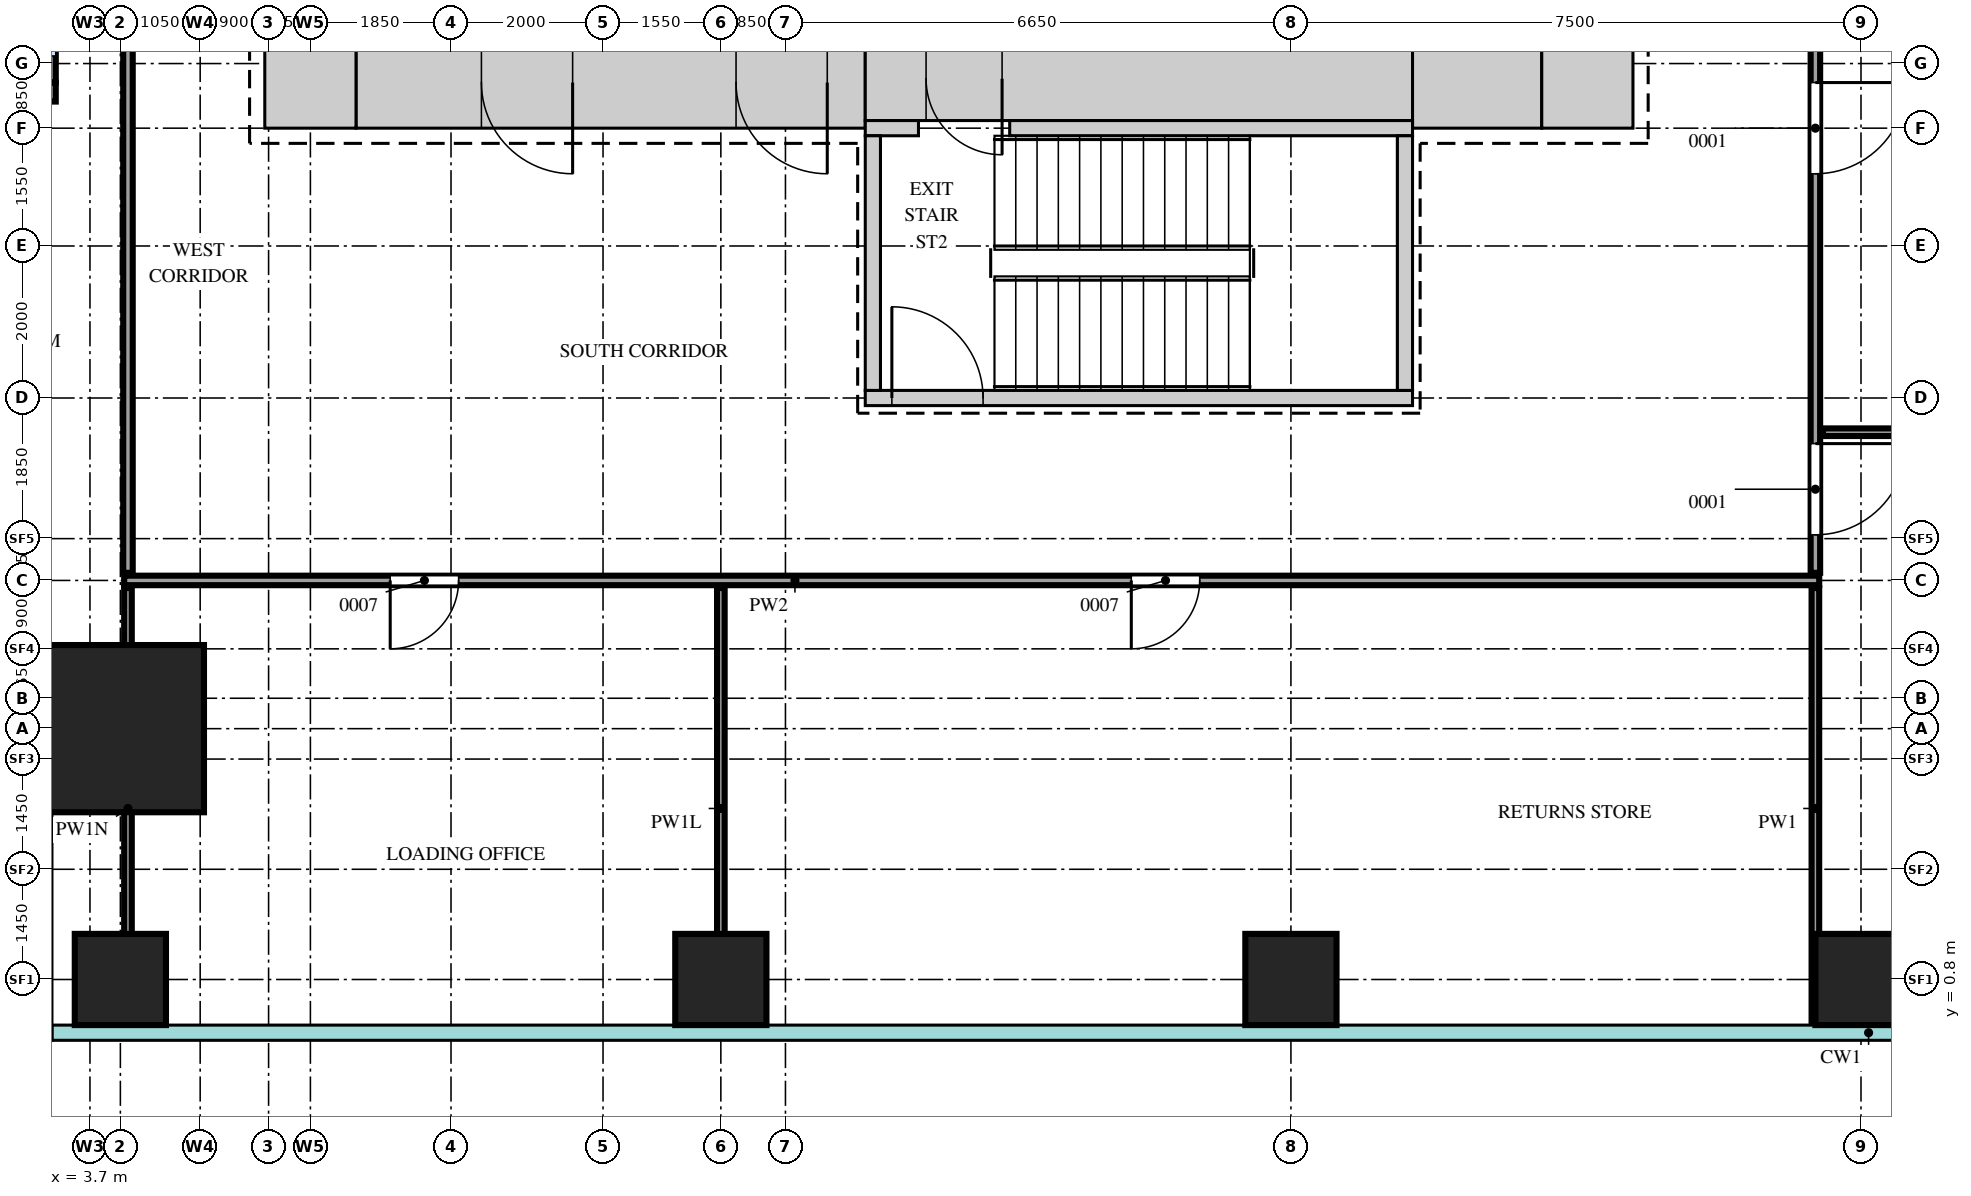
"""IFC4 building model, lengths in metres.
Left out: names, types, materials, properties, quantities, classifications, styles, units other than length and angle.
Written with IfcOpenShell. Run it as: python <this file> out.ifc"""

import sys

from ifc_helpers import new_model, si_unit, direction, frame, frame_2d, origin, origin_2d, place, context, subcontext, project, spatial, rectangle, extrude, source, transform, mapped, element, fill, save


model = new_model("IFC4")
c1 = context("Model", 3, precision=1e-05, world=origin(), true_north=direction((0.0, 1.0)))
c2 = subcontext(c1, "Body", "Model", "MODEL_VIEW")
j1 = project(units=[si_unit("LENGTHUNIT", "METRE"), si_unit("PLANEANGLEUNIT", "RADIAN")], contexts=[c1])
p1 = place(None, origin())
s1 = spatial("IfcSite", under=j1, at=p1, CompositionType="ELEMENT")
p2 = place(p1, origin())
s2 = spatial("IfcBuilding", under=s1, at=p2, CompositionType="ELEMENT")
p3 = place(p2, frame((0.0, 0.0, 91.5)))
s3 = spatial("IfcBuildingStorey", under=s2, at=p3, CompositionType="ELEMENT", Elevation=91.5)
m1 = source(origin(), c2, "Body", "SweptSolid", [
    extrude(rectangle(XDim=6.7, YDim=1.2, at=frame_2d((3.35, 0.0))), origin(), (0.0, 0.0, 1.0), 4.2),
])
p4 = place(p3, frame((7.2, 12.6, 0.0), z_axis=(0.0, 0.0, 1.0), x_axis=(1.0, 0.0, 0.0)))
e1 = element("IfcWall", 1, at=p4, inside=s3, PredefinedType="SHEAR", context=c2, shape_type="MappedRepresentation", body=[
    mapped(m1, transform((0.0, 0.0, 0.0))),
])
m2 = source(origin(), c2, "Body", "SweptSolid", [
    extrude(rectangle(XDim=1.2, YDim=2.1, at=frame_2d((0.6, 1.05))), frame((0.0, 0.61, 0.0), z_axis=(0.0, -1.0, 0.0), x_axis=(1.0, 0.0, 0.0)), (0.0, 0.0, 1.0), 1.22),
])
p5 = place(p4, frame((5.0, 0.0, 0.0)))
e2 = element("IfcOpeningElement", 2, at=p5, cuts=e1, PredefinedType="OPENING", context=c2, shape_type="MappedRepresentation", body=[
    mapped(m2, transform((0.0, 0.0, 0.0))),
])
p6 = place(p4, frame((1.65, 0.0, 0.0)))
e3 = element("IfcOpeningElement", 3, at=p6, cuts=e1, PredefinedType="OPENING", context=c2, shape_type="MappedRepresentation", body=[
    mapped(m2, transform((0.0, 0.0, 0.0))),
])
m3 = source(origin(), c2, "Body", "SweptSolid", [
    extrude(rectangle(XDim=7.2, YDim=1.1, at=frame_2d((3.6, 0.0))), origin(), (0.0, 0.0, 1.0), 4.2),
])
p7 = place(p3, frame((13.9, 12.65, 0.0), z_axis=(0.0, 0.0, 1.0), x_axis=(1.0, 0.0, 0.0)))
e4 = element("IfcWall", 4, at=p7, inside=s3, PredefinedType="SHEAR", context=c2, shape_type="MappedRepresentation", body=[
    mapped(m3, transform((0.0, 0.0, 0.0))),
])
m4 = source(origin(), c2, "Body", "SweptSolid", [
    extrude(rectangle(XDim=1.0, YDim=2.1, at=frame_2d((0.5, 1.05))), frame((0.0, 0.56, 0.0), z_axis=(0.0, -1.0, 0.0), x_axis=(1.0, 0.0, 0.0)), (0.0, 0.0, 1.0), 1.12),
])
p8 = place(p7, frame((0.8, 0.0, 0.0)))
e5 = element("IfcOpeningElement", 5, at=p8, cuts=e4, PredefinedType="OPENING", context=c2, shape_type="MappedRepresentation", body=[
    mapped(m4, transform((0.0, 0.0, 0.0))),
])
m5 = source(origin(), c2, "Body", "SweptSolid", [
    extrude(rectangle(XDim=1.7, YDim=1.2, at=frame_2d((0.85, 0.0))), origin(), (0.0, 0.0, 1.0), 4.2),
])
p9 = place(p3, frame((21.1, 12.6, 0.0), z_axis=(0.0, 0.0, 1.0), x_axis=(1.0, 0.0, 0.0)))
e6 = element("IfcWall", 6, at=p9, inside=s3, PredefinedType="SHEAR", context=c2, shape_type="MappedRepresentation", body=[
    mapped(m5, transform((0.0, 0.0, 0.0))),
])
m6 = source(origin(), c2, "Body", "SweptSolid", [
    extrude(rectangle(XDim=1.2, YDim=1.2, at=frame_2d((0.6, 0.0))), origin(), (0.0, 0.0, 1.0), 4.2),
])
for number, where, z_axis, x_axis in (
    (7, (22.8, 12.6, 0.0), (0.0, 0.0, 1.0), (1.0, 0.0, 0.0)),
    (8, (6.0, 12.6, 0.0), (0.0, 0.0, 1.0), (1.0, 0.0, 0.0)),
):
    element("IfcWall", number, at=place(p3, frame(where, z_axis=z_axis, x_axis=x_axis)), inside=s3, PredefinedType="SHEAR", context=c2, shape_type="MappedRepresentation", body=[
        mapped(m6, transform((0.0, 0.0, 0.0))),
    ])
m7 = source(origin(), c2, "Body", "SweptSolid", [
    extrude(rectangle(XDim=0.7, YDim=0.2, at=frame_2d((0.35, 0.0))), origin(), (0.0, 0.0, 1.0), 4.2),
])
p10 = place(p3, frame((13.9, 12.0, 0.0), z_axis=(0.0, 0.0, 1.0), x_axis=(1.0, 0.0, 0.0)))
e9 = element("IfcWall", 9, at=p10, inside=s3, PredefinedType="SHEAR", context=c2, shape_type="MappedRepresentation", body=[
    mapped(m7, transform((0.0, 0.0, 0.0))),
])
m8 = source(origin(), c2, "Body", "SweptSolid", [
    extrude(rectangle(XDim=5.3, YDim=0.2, at=frame_2d((2.65, 0.0))), origin(), (0.0, 0.0, 1.0), 4.2),
])
p11 = place(p3, frame((15.8, 12.0, 0.0), z_axis=(0.0, 0.0, 1.0), x_axis=(1.0, 0.0, 0.0)))
e10 = element("IfcWall", 10, at=p11, inside=s3, PredefinedType="SHEAR", context=c2, shape_type="MappedRepresentation", body=[
    mapped(m8, transform((0.0, 0.0, 0.0))),
])
m9 = source(origin(), c2, "Body", "SweptSolid", [
    extrude(rectangle(XDim=7.2, YDim=0.2, at=frame_2d((3.6, 0.0))), origin(), (0.0, 0.0, 1.0), 4.2),
])
p12 = place(p3, frame((13.9, 8.45, 0.0), z_axis=(0.0, 0.0, 1.0), x_axis=(1.0, 0.0, 0.0)))
e11 = element("IfcWall", 11, at=p12, inside=s3, PredefinedType="SHEAR", context=c2, shape_type="MappedRepresentation", body=[
    mapped(m9, transform((0.0, 0.0, 0.0))),
])
m10 = source(origin(), c2, "Body", "SweptSolid", [
    extrude(rectangle(XDim=1.2, YDim=2.1, at=frame_2d((0.6, 1.05))), frame((0.0, 0.11, 0.0), z_axis=(0.0, -1.0, 0.0), x_axis=(1.0, 0.0, 0.0)), (0.0, 0.0, 1.0), 0.22),
])
p13 = place(p12, frame((0.35, 0.0, 0.0)))
e12 = element("IfcOpeningElement", 12, at=p13, cuts=e11, PredefinedType="OPENING", context=c2, shape_type="MappedRepresentation", body=[
    mapped(m10, transform((0.0, 0.0, 0.0))),
])
m11 = source(origin(), c2, "Body", "SweptSolid", [
    extrude(rectangle(XDim=3.35, YDim=0.2, at=frame_2d((1.675, 0.0))), origin(), (0.0, 0.0, 1.0), 4.2),
])
for number, where, z_axis, x_axis in (
    (13, (21.0, 8.55, 0.0), (0.0, 0.0, 1.0), (0.0, 1.0, 0.0)),
    (14, (14.0, 8.55, 0.0), (0.0, 0.0, 1.0), (0.0, 1.0, 0.0)),
):
    element("IfcWall", number, at=place(p3, frame(where, z_axis=z_axis, x_axis=x_axis)), inside=s3, PredefinedType="SHEAR", context=c2, shape_type="MappedRepresentation", body=[
        mapped(m11, transform((0.0, 0.0, 0.0))),
    ])
m12 = source(origin(), c2, "Body", "SweptSolid", [
    extrude(rectangle(XDim=2.2, YDim=2.2, at=origin_2d()), origin(), (0.0, 0.0, 1.0), 4.5),
])
p14 = place(p3, frame((4.1, 4.1, 0.0), z_axis=(0.0, 0.0, 1.0), x_axis=(1.0, 0.0, 0.0)))
e15 = element("IfcColumn", 15, at=p14, inside=s3, PredefinedType="COLUMN", context=c2, shape_type="MappedRepresentation", body=[
    mapped(m12, transform((0.0, 0.0, 0.0))),
])
m13 = source(origin(), c2, "Body", "SweptSolid", [
    extrude(rectangle(XDim=1.2, YDim=1.2, at=origin_2d()), origin(), (0.0, 0.0, 1.0), 4.5),
])
for number, where, z_axis, x_axis in (
    (16, (4.1, 0.8, 0.0), (0.0, 0.0, 1.0), (1.0, 0.0, 0.0)),
    (17, (12.0, 0.8, 0.0), (0.0, 0.0, 1.0), (1.0, 0.0, 0.0)),
    (18, (19.5, 0.8, 0.0), (0.0, 0.0, 1.0), (1.0, 0.0, 0.0)),
    (19, (27.0, 0.8, 0.0), (0.0, 0.0, 1.0), (1.0, 0.0, 0.0)),
):
    element("IfcColumn", number, at=place(p3, frame(where, z_axis=z_axis, x_axis=x_axis)), inside=s3, PredefinedType="COLUMN", context=c2, shape_type="MappedRepresentation", body=[
        mapped(m13, transform((0.0, 0.0, 0.0))),
    ])
m14 = source(origin(), c2, "Body", "SweptSolid", [
    extrude(rectangle(XDim=6.3, YDim=0.25, at=frame_2d((3.15, 0.0))), origin(), (0.0, 0.0, 1.0), 4.2),
])
p15 = place(p3, frame((3.125, 12.6, 0.0), z_axis=(0.0, 0.0, 1.0), x_axis=(0.0, 1.0, 0.0)))
e20 = element("IfcWall", 20, at=p15, inside=s3, PredefinedType="SOLIDWALL", context=c2, shape_type="MappedRepresentation", body=[
    mapped(m14, transform((0.0, 0.0, 0.0))),
])
m15 = source(origin(), c2, "Body", "SweptSolid", [
    extrude(rectangle(XDim=1.6, YDim=2.4, at=frame_2d((0.8, 1.2))), frame((0.0, 0.135, 0.0), z_axis=(0.0, -1.0, 0.0), x_axis=(1.0, 0.0, 0.0)), (0.0, 0.0, 1.0), 0.27),
])
p16 = place(p15, frame((0.35, 0.0, 0.0)))
e21 = element("IfcOpeningElement", 21, at=p16, cuts=e20, PredefinedType="OPENING", context=c2, shape_type="MappedRepresentation", body=[
    mapped(m15, transform((0.0, 0.0, 0.0))),
])
p17 = place(p15, frame((4.35, 0.0, 0.0)))
e22 = element("IfcOpeningElement", 22, at=p17, cuts=e20, PredefinedType="OPENING", context=c2, shape_type="MappedRepresentation", body=[
    mapped(m15, transform((0.0, 0.0, 0.0))),
])
m16 = source(origin(), c2, "Body", "SweptSolid", [
    extrude(rectangle(XDim=1.8, YDim=2.4, at=frame_2d((0.9, 1.2))), frame((0.0, 0.135, 0.0), z_axis=(0.0, -1.0, 0.0), x_axis=(1.0, 0.0, 0.0)), (0.0, 0.0, 1.0), 0.27),
])
p18 = place(p15, frame((2.25, 0.0, 0.0)))
e23 = element("IfcOpeningElement", 23, at=p18, cuts=e20, PredefinedType="OPENING", context=c2, shape_type="MappedRepresentation", body=[
    mapped(m16, transform((0.0, 0.0, 0.0))),
])
m17 = source(origin(), c2, "Body", "SweptSolid", [
    extrude(rectangle(XDim=1.85, YDim=0.25, at=frame_2d((0.925, 0.0))), origin(), (0.0, 0.0, 1.0), 4.2),
])
p19 = place(p3, frame((1.4, 12.475, 0.0), z_axis=(0.0, 0.0, 1.0), x_axis=(1.0, 0.0, 0.0)))
e24 = element("IfcWall", 24, at=p19, inside=s3, PredefinedType="SOLIDWALL", context=c2, shape_type="MappedRepresentation", body=[
    mapped(m17, transform((0.0, 0.0, 0.0))),
])
m18 = source(origin(), c2, "Body", "SweptSolid", [
    extrude(rectangle(XDim=5.8, YDim=0.1, at=frame_2d((2.9, 0.0))), origin(), (0.0, 0.0, 1.0), 3.5),
])
p20 = place(p3, frame((4.2, 0.15, 0.0), z_axis=(0.0, 0.0, 1.0), x_axis=(0.0, 1.0, 0.0)))
e25 = element("IfcWall", 25, at=p20, inside=s3, PredefinedType="PARTITIONING", context=c2, shape_type="MappedRepresentation", body=[
    mapped(m18, transform((0.0, 0.0, 0.0))),
])
m19 = source(origin(), c2, "Body", "SweptSolid", [
    extrude(rectangle(XDim=5.8, YDim=0.1, at=frame_2d((2.9, 0.0))), origin(), (0.0, 0.0, 1.0), 3.6),
])
p21 = place(p3, frame((12.0, 0.15, 0.0), z_axis=(0.0, 0.0, 1.0), x_axis=(0.0, 1.0, 0.0)))
e26 = element("IfcWall", 26, at=p21, inside=s3, PredefinedType="PARTITIONING", context=c2, shape_type="MappedRepresentation", body=[
    mapped(m19, transform((0.0, 0.0, 0.0))),
])
m20 = source(origin(), c2, "Body", "SweptSolid", [
    extrude(rectangle(XDim=5.8, YDim=0.1, at=frame_2d((2.9, 0.0))), origin(), (0.0, 0.0, 1.0), 4.3),
])
p22 = place(p3, frame((26.4, 0.15, 0.0), z_axis=(0.0, 0.0, 1.0), x_axis=(0.0, 1.0, 0.0)))
e27 = element("IfcWall", 27, at=p22, inside=s3, PredefinedType="PARTITIONING", context=c2, shape_type="MappedRepresentation", body=[
    mapped(m20, transform((0.0, 0.0, 0.0))),
])
m21 = source(origin(), c2, "Body", "SweptSolid", [
    extrude(rectangle(XDim=22.3, YDim=0.125, at=frame_2d((11.15, 0.0))), origin(), (0.0, 0.0, 1.0), 4.3),
])
p23 = place(p3, frame((4.15, 6.05, 0.0), z_axis=(0.0, 0.0, 1.0), x_axis=(1.0, 0.0, 0.0)))
e28 = element("IfcWall", 28, at=p23, inside=s3, PredefinedType="PARTITIONING", context=c2, shape_type="MappedRepresentation", body=[
    mapped(m21, transform((0.0, 0.0, 0.0))),
])
m22 = source(origin(), c2, "Body", "SweptSolid", [
    extrude(rectangle(XDim=0.9, YDim=2.1, at=frame_2d((0.45, 1.05))), frame((0.0, 0.073, 0.0), z_axis=(0.0, -1.0, 0.0), x_axis=(1.0, 0.0, 0.0)), (0.0, 0.0, 1.0), 0.145),
])
p24 = place(p23, frame((3.5, 0.0, 0.0)))
e29 = element("IfcOpeningElement", 29, at=p24, cuts=e28, PredefinedType="OPENING", context=c2, shape_type="MappedRepresentation", body=[
    mapped(m22, transform((0.0, 0.0, 0.0))),
])
p25 = place(p23, frame((13.25, 0.0, 0.0)))
e30 = element("IfcOpeningElement", 30, at=p25, cuts=e28, PredefinedType="OPENING", context=c2, shape_type="MappedRepresentation", body=[
    mapped(m22, transform((0.0, 0.0, 0.0))),
])
m23 = source(origin(), c2, "Body", "SweptSolid", [
    extrude(rectangle(XDim=41.8, YDim=0.125, at=frame_2d((20.9, 0.0))), origin(), (0.0, 0.0, 1.0), 4.3),
])
p26 = place(p3, frame((4.2, 6.15, 0.0), z_axis=(0.0, 0.0, 1.0), x_axis=(0.0, 1.0, 0.0)))
e31 = element("IfcWall", 31, at=p26, inside=s3, PredefinedType="PARTITIONING", context=c2, shape_type="MappedRepresentation", body=[
    mapped(m23, transform((0.0, 0.0, 0.0))),
])
m24 = source(origin(), c2, "Body", "SweptSolid", [
    extrude(rectangle(XDim=1.2, YDim=2.1, at=frame_2d((0.6, 1.05))), frame((0.0, 0.073, 0.0), z_axis=(0.0, -1.0, 0.0), x_axis=(1.0, 0.0, 0.0)), (0.0, 0.0, 1.0), 0.145),
])
p27 = place(p26, frame((7.45, 0.0, 0.0)))
e32 = element("IfcOpeningElement", 32, at=p27, cuts=e31, PredefinedType="OPENING", context=c2, shape_type="MappedRepresentation", body=[
    mapped(m24, transform((0.0, 0.0, 0.0))),
])
p28 = place(p26, frame((26.05, 0.0, 0.0)))
e33 = element("IfcOpeningElement", 33, at=p28, cuts=e31, PredefinedType="OPENING", context=c2, shape_type="MappedRepresentation", body=[
    mapped(m24, transform((0.0, 0.0, 0.0))),
])
m25 = source(origin(), c2, "Body", "SweptSolid", [
    extrude(rectangle(XDim=29.05, YDim=0.125, at=frame_2d((14.525, 0.0))), origin(), (0.0, 0.0, 1.0), 4.3),
])
p29 = place(p3, frame((26.4, 6.15, 0.0), z_axis=(0.0, 0.0, 1.0), x_axis=(0.0, 1.0, 0.0)))
e34 = element("IfcWall", 34, at=p29, inside=s3, PredefinedType="PARTITIONING", context=c2, shape_type="MappedRepresentation", body=[
    mapped(m25, transform((0.0, 0.0, 0.0))),
])
p30 = place(p29, frame((0.5, 0.0, 0.0)))
e35 = element("IfcOpeningElement", 35, at=p30, cuts=e34, PredefinedType="OPENING", context=c2, shape_type="MappedRepresentation", body=[
    mapped(m24, transform((0.0, 0.0, 0.0))),
])
p31 = place(p29, frame((5.25, 0.0, 0.0)))
e36 = element("IfcOpeningElement", 36, at=p31, cuts=e34, PredefinedType="OPENING", context=c2, shape_type="MappedRepresentation", body=[
    mapped(m24, transform((0.0, 0.0, 0.0))),
])
p32 = place(p29, frame((13.25, 0.0, 0.0)))
e37 = element("IfcOpeningElement", 37, at=p32, cuts=e34, PredefinedType="OPENING", context=c2, shape_type="MappedRepresentation", body=[
    mapped(m24, transform((0.0, 0.0, 0.0))),
])
m26 = source(origin(), c2, "Body", "SweptSolid", [
    extrude(rectangle(XDim=27.35, YDim=0.1, at=frame_2d((13.675, 0.0))), origin(), (0.0, 0.0, 1.0), 4.3),
])
p33 = place(p3, frame((26.5, 8.0, 0.0), z_axis=(0.0, 0.0, 1.0), x_axis=(1.0, 0.0, 0.0)))
e38 = element("IfcWall", 38, at=p33, inside=s3, PredefinedType="PARTITIONING", context=c2, shape_type="MappedRepresentation", body=[
    mapped(m26, transform((0.0, 0.0, 0.0))),
])
m27 = source(origin(), c2, "Body", "SweptSolid", [
    extrude(rectangle(XDim=1.2, YDim=2.1, at=frame_2d((0.6, 1.05))), frame((0.0, 0.55, 0.0), z_axis=(0.0, -1.0, 0.0), x_axis=(1.0, 0.0, 0.0)), (0.0, 0.0, 1.0), 1.1),
])
p34 = place(p5, origin())
e39 = element("IfcDoor", 39, at=p34, inside=s3, OperationType="SINGLE_SWING_RIGHT", PredefinedType="DOOR", context=c2, shape_type="MappedRepresentation", body=[
    mapped(m27, transform((0.0, 0.0, 0.0))),
])
fill(e2, e39)
p35 = place(p6, origin())
e40 = element("IfcDoor", 40, at=p35, inside=s3, OperationType="SINGLE_SWING_RIGHT", PredefinedType="DOOR", context=c2, shape_type="MappedRepresentation", body=[
    mapped(m27, transform((0.0, 0.0, 0.0))),
])
fill(e3, e40)
m28 = source(origin(), c2, "Body", "SweptSolid", [
    extrude(rectangle(XDim=1.0, YDim=2.1, at=frame_2d((0.5, 1.05))), frame((0.0, 0.5, 0.0), z_axis=(0.0, -1.0, 0.0), x_axis=(1.0, 0.0, 0.0)), (0.0, 0.0, 1.0), 1.0),
])
p36 = place(p8, origin())
e41 = element("IfcDoor", 41, at=p36, inside=s3, OperationType="SINGLE_SWING_RIGHT", PredefinedType="DOOR", context=c2, shape_type="MappedRepresentation", body=[
    mapped(m28, transform((0.0, 0.0, 0.0))),
])
fill(e5, e41)
m29 = source(origin(), c2, "Body", "SweptSolid", [
    extrude(rectangle(XDim=1.2, YDim=2.1, at=frame_2d((0.6, 1.05))), frame((0.0, 0.025, 0.0), z_axis=(0.0, -1.0, 0.0), x_axis=(1.0, 0.0, 0.0)), (0.0, 0.0, 1.0), 0.05),
])
p37 = place(p30, origin())
e42 = element("IfcDoor", 42, at=p37, inside=s3, OperationType="SINGLE_SWING_RIGHT", PredefinedType="DOOR", context=c2, shape_type="MappedRepresentation", body=[
    mapped(m29, transform((0.0, 0.0, 0.0))),
])
fill(e35, e42)
p38 = place(p31, origin())
e43 = element("IfcDoor", 43, at=p38, inside=s3, OperationType="SINGLE_SWING_RIGHT", PredefinedType="DOOR", context=c2, shape_type="MappedRepresentation", body=[
    mapped(m29, transform((0.0, 0.0, 0.0))),
])
fill(e36, e43)
m30 = source(origin(), c2, "Body", "SweptSolid", [
    extrude(rectangle(XDim=0.9, YDim=2.1, at=frame_2d((0.45, 1.05))), frame((0.0, 0.025, 0.0), z_axis=(0.0, -1.0, 0.0), x_axis=(1.0, 0.0, 0.0)), (0.0, 0.0, 1.0), 0.05),
])
p39 = place(p24, origin())
e44 = element("IfcDoor", 44, at=p39, inside=s3, OperationType="SINGLE_SWING_LEFT", PredefinedType="DOOR", context=c2, shape_type="MappedRepresentation", body=[
    mapped(m30, transform((0.0, 0.0, 0.0))),
])
fill(e29, e44)
p40 = place(p25, origin())
e45 = element("IfcDoor", 45, at=p40, inside=s3, OperationType="SINGLE_SWING_LEFT", PredefinedType="DOOR", context=c2, shape_type="MappedRepresentation", body=[
    mapped(m30, transform((0.0, 0.0, 0.0))),
])
fill(e30, e45)
p41 = place(p13, origin())
e46 = element("IfcDoor", 46, at=p41, inside=s3, OperationType="SINGLE_SWING_RIGHT", PredefinedType="DOOR", context=c2, shape_type="MappedRepresentation", body=[
    mapped(m29, transform((0.0, 0.0, 0.0))),
])
fill(e12, e46)
save(model, sys.argv[1])
